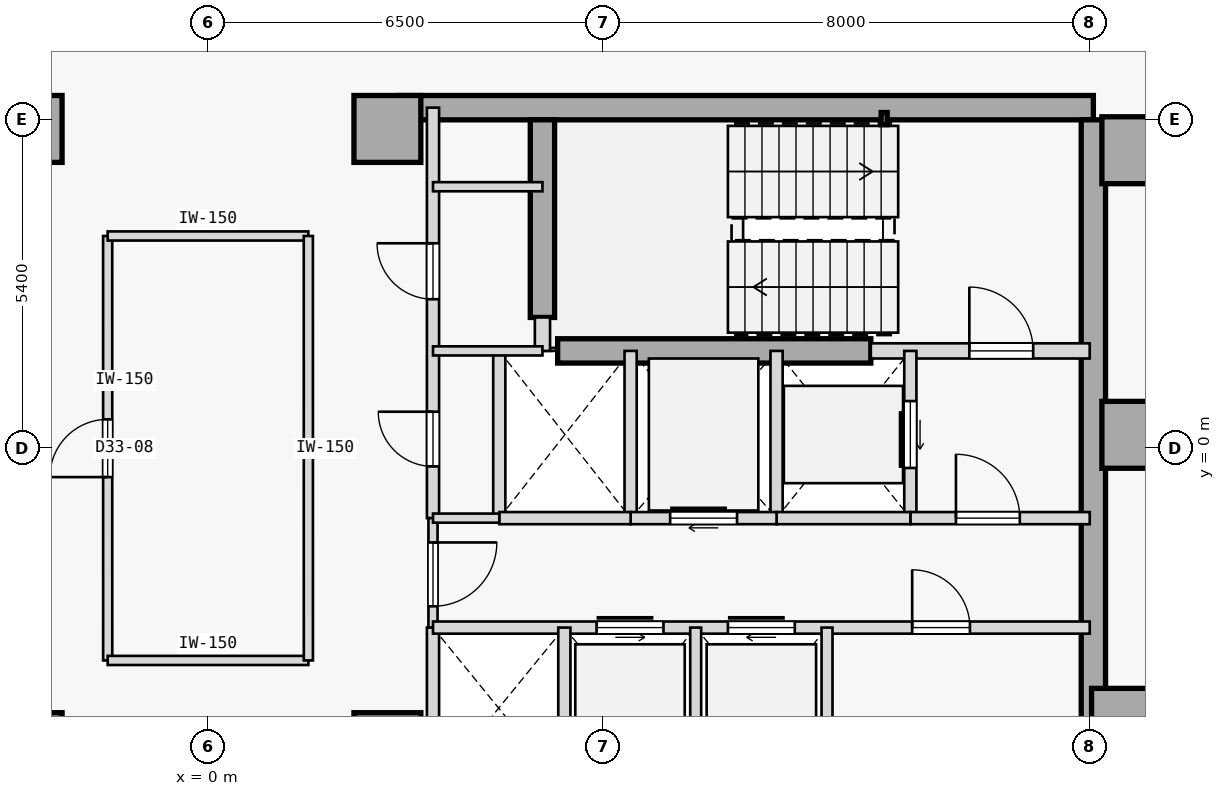
"""IFC4 building model, lengths in metres.
Left out: names, types, materials, properties, quantities, classifications, styles, units other than length and angle.
Written with IfcOpenShell. Run it as: python <this file> out.ifc"""

import sys

from ifc_helpers import new_model, si_unit, direction, frame, frame_2d, origin, origin_2d, place, context, subcontext, project, spatial, rectangle, hollow_rectangle, extrude, element, fill, save


model = new_model("IFC4")
c1 = context("Model", 3, precision=1e-05, world=origin(), true_north=direction((0.0, 1.0)))
c2 = subcontext(c1, "Body", "Model", "MODEL_VIEW")
j1 = project(units=[si_unit("LENGTHUNIT", "METRE"), si_unit("PLANEANGLEUNIT", "RADIAN")], contexts=[c1])
p1 = place(None, origin())
s1 = spatial("IfcSite", under=j1, at=p1, CompositionType="ELEMENT")
p2 = place(p1, origin())
s2 = spatial("IfcBuilding", under=s1, at=p2, CompositionType="ELEMENT")
p3 = place(p2, frame((0.0, 0.0, 131.8)))
s3 = spatial("IfcBuildingStorey", under=s2, at=p3, CompositionType="ELEMENT", Elevation=131.8)
for number, where, z_axis, x_axis in (
    (1, (-2.95, -4.9, 0.0), (0.0, 0.0, 1.0), (1.0, 0.0, 0.0)),
    (2, (-2.95, 5.25, 0.0), (0.0, 0.0, 1.0), (1.0, 0.0, 0.0)),
    (3, (15.25, 4.9, 0.0), (0.0, 0.0, 1.0), (1.0, 0.0, 0.0)),
    (4, (15.25, 0.22, 0.0), (0.0, 0.0, 1.0), (1.0, 0.0, 0.0)),
    (5, (15.08, -4.5, 0.0), (0.0, 0.0, 1.0), (1.0, 0.0, 0.0)),
    (6, (2.95, -4.9, 0.0), (0.0, 0.0, 1.0), (1.0, 0.0, 0.0)),
    (7, (2.95, 5.25, 0.0), (0.0, 0.0, 1.0), (1.0, 0.0, 0.0)),
):
    element("IfcColumn", number, at=place(p3, frame(where, z_axis=z_axis, x_axis=x_axis)), inside=s3, PredefinedType="COLUMN", context=c2, shape_type="SweptSolid", body=[
        extrude(rectangle(XDim=1.1, YDim=1.1, at=origin_2d()), origin(), (0.0, 0.0, 1.0), 3.7),
    ])
p4 = place(p3, frame((3.15, 5.6, 0.0), z_axis=(0.0, 0.0, 1.0), x_axis=(1.0, 0.0, 0.0)))
e8 = element("IfcWall", 8, at=p4, inside=s3, PredefinedType="SHEAR", context=c2, shape_type="SweptSolid", body=[
    extrude(rectangle(XDim=11.41, YDim=0.4, at=frame_2d((5.705, 0.0))), origin(), (0.0, 0.0, 1.0), 3.475),
])
p5 = place(p3, frame((14.56, -5.4, 0.0), z_axis=(0.0, 0.0, 1.0), x_axis=(0.0, 1.0, 0.0)))
e9 = element("IfcWall", 9, at=p5, inside=s3, PredefinedType="SHEAR", context=c2, shape_type="SweptSolid", body=[
    extrude(rectangle(XDim=10.8, YDim=0.4, at=frame_2d((5.4, 0.0))), origin(), (0.0, 0.0, 1.0), 3.475),
])
p6 = place(p3, frame((5.5, 2.15, 0.0), z_axis=(0.0, 0.0, 1.0), x_axis=(0.0, 1.0, 0.0)))
e10 = element("IfcWall", 10, at=p6, inside=s3, PredefinedType="SHEAR", context=c2, shape_type="SweptSolid", body=[
    extrude(rectangle(XDim=3.25, YDim=0.4, at=frame_2d((1.625, 0.0))), origin(), (0.0, 0.0, 1.0), 3.475),
])
p7 = place(p3, frame((5.75, 1.6, 0.0), z_axis=(0.0, 0.0, 1.0), x_axis=(1.0, 0.0, 0.0)))
e11 = element("IfcWall", 11, at=p7, inside=s3, PredefinedType="SHEAR", context=c2, shape_type="SweptSolid", body=[
    extrude(rectangle(XDim=5.15, YDim=0.4, at=frame_2d((2.575, 0.0))), origin(), (0.0, 0.0, 1.0), 3.475),
])
p8 = place(p3, frame((11.12, 5.42, 0.0), z_axis=(0.0, 0.0, 1.0), x_axis=(1.0, 0.0, 0.0)))
e12 = element("IfcColumn", 12, at=p8, inside=s3, PredefinedType="COLUMN", context=c2, shape_type="SweptSolid", body=[
    extrude(hollow_rectangle(XDim=0.1, YDim=0.2, WallThickness=0.008, at=origin_2d()), origin(), (0.0, 0.0, 1.0), 3.7),
])
p9 = place(p3, frame((10.9, 1.6, 0.0), z_axis=(0.0, 0.0, 1.0), x_axis=(1.0, 0.0, 0.0)))
e13 = element("IfcWall", 13, at=p9, inside=s3, PredefinedType="STANDARD", context=c2, shape_type="SweptSolid", body=[
    extrude(rectangle(XDim=3.6, YDim=0.25, at=frame_2d((1.8, 0.0))), origin(), (0.0, 0.0, 1.0), 3.475),
])
p10 = place(p9, frame((1.62, 0.0, 0.0)))
e14 = element("IfcOpeningElement", 14, at=p10, cuts=e13, PredefinedType="OPENING", context=c2, shape_type="SweptSolid", body=[
    extrude(rectangle(XDim=1.05, YDim=2.15, at=frame_2d((0.525, 1.075))), frame((0.0, 0.135, 0.0), z_axis=(0.0, -1.0, 0.0), x_axis=(1.0, 0.0, 0.0)), (0.0, 0.0, 1.0), 0.27),
])
p11 = place(p3, frame((5.5, 1.6, 0.0), z_axis=(0.0, 0.0, 1.0), x_axis=(0.0, 1.0, 0.0)))
e15 = element("IfcWall", 15, at=p11, inside=s3, PredefinedType="STANDARD", context=c2, shape_type="SweptSolid", body=[
    extrude(rectangle(XDim=0.55, YDim=0.25, at=frame_2d((0.275, 0.0))), origin(), (0.0, 0.0, 1.0), 3.475),
])
p12 = place(p3, frame((3.7, -1.15, 0.0), z_axis=(0.0, 0.0, 1.0), x_axis=(0.0, 1.0, 0.0)))
e16 = element("IfcWall", 16, at=p12, inside=s3, PredefinedType="STANDARD", context=c2, shape_type="SweptSolid", body=[
    extrude(rectangle(XDim=6.75, YDim=0.2, at=frame_2d((3.375, 0.0))), origin(), (0.0, 0.0, 1.0), 3.475),
])
p13 = place(p12, frame((3.6, 0.0, 0.0)))
e17 = element("IfcOpeningElement", 17, at=p13, cuts=e16, PredefinedType="OPENING", context=c2, shape_type="SweptSolid", body=[
    extrude(rectangle(XDim=0.92, YDim=2.15, at=frame_2d((0.46, 1.075))), frame((0.0, 0.11, 0.0), z_axis=(0.0, -1.0, 0.0), x_axis=(1.0, 0.0, 0.0)), (0.0, 0.0, 1.0), 0.22),
])
p14 = place(p12, frame((0.85, 0.0, 0.0)))
e18 = element("IfcOpeningElement", 18, at=p14, cuts=e16, PredefinedType="OPENING", context=c2, shape_type="SweptSolid", body=[
    extrude(rectangle(XDim=0.9, YDim=2.15, at=frame_2d((0.45, 1.075))), frame((0.0, 0.11, 0.0), z_axis=(0.0, -1.0, 0.0), x_axis=(1.0, 0.0, 0.0)), (0.0, 0.0, 1.0), 0.22),
])
p15 = place(p3, frame((3.7, -2.95, 0.0), z_axis=(0.0, 0.0, 1.0), x_axis=(0.0, 1.0, 0.0)))
e19 = element("IfcWall", 19, at=p15, inside=s3, PredefinedType="PARTITIONING", context=c2, shape_type="SweptSolid", body=[
    extrude(rectangle(XDim=1.8, YDim=0.15, at=frame_2d((0.9, 0.0))), origin(), (0.0, 0.0, 1.0), 3.475),
])
p16 = place(p15, frame((0.35, 0.0, 0.0)))
e20 = element("IfcOpeningElement", 20, at=p16, cuts=e19, PredefinedType="OPENING", context=c2, shape_type="SweptSolid", body=[
    extrude(rectangle(XDim=1.05, YDim=2.18, at=frame_2d((0.525, 1.09))), frame((0.0, 0.085, 0.0), z_axis=(0.0, -1.0, 0.0), x_axis=(1.0, 0.0, 0.0)), (0.0, 0.0, 1.0), 0.17),
])
p17 = place(p3, frame((3.7, -5.6, 0.0), z_axis=(0.0, 0.0, 1.0), x_axis=(0.0, 1.0, 0.0)))
e21 = element("IfcWall", 21, at=p17, inside=s3, PredefinedType="STANDARD", context=c2, shape_type="SweptSolid", body=[
    extrude(rectangle(XDim=2.65, YDim=0.2, at=frame_2d((1.325, 0.0))), origin(), (0.0, 0.0, 1.0), 3.475),
])
p18 = place(p3, frame((11.55, -1.15, 0.0), z_axis=(0.0, 0.0, 1.0), x_axis=(0.0, 1.0, 0.0)))
e22 = element("IfcWall", 22, at=p18, inside=s3, PredefinedType="STANDARD", context=c2, shape_type="SweptSolid", body=[
    extrude(rectangle(XDim=2.75, YDim=0.2, at=frame_2d((1.375, 0.0))), origin(), (0.0, 0.0, 1.0), 3.475),
])
p19 = place(p18, frame((0.825, 0.0, 0.0)))
e23 = element("IfcOpeningElement", 23, at=p19, cuts=e22, PredefinedType="OPENING", context=c2, shape_type="SweptSolid", body=[
    extrude(rectangle(XDim=1.1, YDim=2.15, at=frame_2d((0.55, 1.075))), frame((0.0, 0.11, 0.0), z_axis=(0.0, -1.0, 0.0), x_axis=(1.0, 0.0, 0.0)), (0.0, 0.0, 1.0), 0.22),
])
p20 = place(p3, frame((9.35, -1.15, 0.0), z_axis=(0.0, 0.0, 1.0), x_axis=(0.0, 1.0, 0.0)))
e24 = element("IfcWall", 24, at=p20, inside=s3, PredefinedType="STANDARD", context=c2, shape_type="SweptSolid", body=[
    extrude(rectangle(XDim=2.75, YDim=0.2, at=frame_2d((1.375, 0.0))), origin(), (0.0, 0.0, 1.0), 3.475),
])
p21 = place(p3, frame((11.55, -1.15, 0.0), z_axis=(0.0, 0.0, 1.0), x_axis=(1.0, 0.0, 0.0)))
e25 = element("IfcWall", 25, at=p21, inside=s3, PredefinedType="STANDARD", context=c2, shape_type="SweptSolid", body=[
    extrude(rectangle(XDim=2.95, YDim=0.2, at=frame_2d((1.475, 0.0))), origin(), (0.0, 0.0, 1.0), 3.475),
])
p22 = place(p21, frame((0.75, 0.0, 0.0)))
e26 = element("IfcOpeningElement", 26, at=p22, cuts=e25, PredefinedType="OPENING", context=c2, shape_type="SweptSolid", body=[
    extrude(rectangle(XDim=1.05, YDim=2.18, at=frame_2d((0.525, 1.09))), frame((0.0, 0.11, 0.0), z_axis=(0.0, -1.0, 0.0), x_axis=(1.0, 0.0, 0.0)), (0.0, 0.0, 1.0), 0.22),
])
p23 = place(p3, frame((9.35, -1.15, 0.0), z_axis=(0.0, 0.0, 1.0), x_axis=(1.0, 0.0, 0.0)))
e27 = element("IfcWall", 27, at=p23, inside=s3, PredefinedType="STANDARD", context=c2, shape_type="SweptSolid", body=[
    extrude(rectangle(XDim=2.2, YDim=0.2, at=frame_2d((1.1, 0.0))), origin(), (0.0, 0.0, 1.0), 3.475),
])
p24 = place(p3, frame((6.95, -1.15, 0.0), z_axis=(0.0, 0.0, 1.0), x_axis=(0.0, 1.0, 0.0)))
e28 = element("IfcWall", 28, at=p24, inside=s3, PredefinedType="STANDARD", context=c2, shape_type="SweptSolid", body=[
    extrude(rectangle(XDim=2.75, YDim=0.2, at=frame_2d((1.375, 0.0))), origin(), (0.0, 0.0, 1.0), 3.475),
])
p25 = place(p3, frame((6.95, -1.15, 0.0), z_axis=(0.0, 0.0, 1.0), x_axis=(1.0, 0.0, 0.0)))
e29 = element("IfcWall", 29, at=p25, inside=s3, PredefinedType="STANDARD", context=c2, shape_type="SweptSolid", body=[
    extrude(rectangle(XDim=2.4, YDim=0.2, at=frame_2d((1.2, 0.0))), origin(), (0.0, 0.0, 1.0), 3.475),
])
p26 = place(p25, frame((0.65, 0.0, 0.0)))
e30 = element("IfcOpeningElement", 30, at=p26, cuts=e29, PredefinedType="OPENING", context=c2, shape_type="SweptSolid", body=[
    extrude(rectangle(XDim=1.1, YDim=2.15, at=frame_2d((0.55, 1.075))), frame((0.0, 0.11, 0.0), z_axis=(0.0, -1.0, 0.0), x_axis=(1.0, 0.0, 0.0)), (0.0, 0.0, 1.0), 0.22),
])
p27 = place(p3, frame((4.79, -1.15, 0.0), z_axis=(0.0, 0.0, 1.0), x_axis=(0.0, 1.0, 0.0)))
e31 = element("IfcWall", 31, at=p27, inside=s3, PredefinedType="STANDARD", context=c2, shape_type="SweptSolid", body=[
    extrude(rectangle(XDim=2.75, YDim=0.2, at=frame_2d((1.375, 0.0))), origin(), (0.0, 0.0, 1.0), 3.475),
])
p28 = place(p3, frame((4.79, -1.15, 0.0), z_axis=(0.0, 0.0, 1.0), x_axis=(1.0, 0.0, 0.0)))
e32 = element("IfcWall", 32, at=p28, inside=s3, PredefinedType="STANDARD", context=c2, shape_type="SweptSolid", body=[
    extrude(rectangle(XDim=2.16, YDim=0.2, at=frame_2d((1.08, 0.0))), origin(), (0.0, 0.0, 1.0), 3.475),
])
p29 = place(p3, frame((3.7, -1.15, 0.0), z_axis=(0.0, 0.0, 1.0), x_axis=(1.0, 0.0, 0.0)))
e33 = element("IfcWall", 33, at=p29, inside=s3, PredefinedType="PARTITIONING", context=c2, shape_type="SweptSolid", body=[
    extrude(rectangle(XDim=1.09, YDim=0.15, at=frame_2d((0.545, 0.0))), origin(), (0.0, 0.0, 1.0), 3.475),
])
p30 = place(p3, frame((3.7, -2.95, 0.0), z_axis=(0.0, 0.0, 1.0), x_axis=(1.0, 0.0, 0.0)))
e34 = element("IfcWall", 34, at=p30, inside=s3, PredefinedType="STANDARD", context=c2, shape_type="SweptSolid", body=[
    extrude(rectangle(XDim=10.8, YDim=0.2, at=frame_2d((5.4, 0.0))), origin(), (0.0, 0.0, 1.0), 3.475),
])
p31 = place(p30, frame((2.69, 0.0, 0.0)))
e35 = element("IfcOpeningElement", 35, at=p31, cuts=e34, PredefinedType="OPENING", context=c2, shape_type="SweptSolid", body=[
    extrude(rectangle(XDim=1.1, YDim=2.15, at=frame_2d((0.55, 1.075))), frame((0.0, 0.11, 0.0), z_axis=(0.0, -1.0, 0.0), x_axis=(1.0, 0.0, 0.0)), (0.0, 0.0, 1.0), 0.22),
])
p32 = place(p30, frame((4.85, 0.0, 0.0)))
e36 = element("IfcOpeningElement", 36, at=p32, cuts=e34, PredefinedType="OPENING", context=c2, shape_type="SweptSolid", body=[
    extrude(rectangle(XDim=1.1, YDim=2.15, at=frame_2d((0.55, 1.075))), frame((0.0, 0.11, 0.0), z_axis=(0.0, -1.0, 0.0), x_axis=(1.0, 0.0, 0.0)), (0.0, 0.0, 1.0), 0.22),
])
p33 = place(p30, frame((7.88, 0.0, 0.0)))
e37 = element("IfcOpeningElement", 37, at=p33, cuts=e34, PredefinedType="OPENING", context=c2, shape_type="SweptSolid", body=[
    extrude(rectangle(XDim=0.95, YDim=2.15, at=frame_2d((0.475, 1.075))), frame((0.0, 0.11, 0.0), z_axis=(0.0, -1.0, 0.0), x_axis=(1.0, 0.0, 0.0)), (0.0, 0.0, 1.0), 0.22),
])
p34 = place(p3, frame((5.86, -5.6, 0.0), z_axis=(0.0, 0.0, 1.0), x_axis=(0.0, 1.0, 0.0)))
e38 = element("IfcWall", 38, at=p34, inside=s3, PredefinedType="STANDARD", context=c2, shape_type="SweptSolid", body=[
    extrude(rectangle(XDim=2.65, YDim=0.2, at=frame_2d((1.325, 0.0))), origin(), (0.0, 0.0, 1.0), 3.475),
])
for number, where, z_axis, x_axis in (
    (39, (10.18, -5.6, 0.0), (0.0, 0.0, 1.0), (0.0, 1.0, 0.0)),
    (40, (8.02, -5.6, 0.0), (0.0, 0.0, 1.0), (0.0, 1.0, 0.0)),
):
    element("IfcWall", number, at=place(p3, frame(where, z_axis=z_axis, x_axis=x_axis)), inside=s3, PredefinedType="STANDARD", context=c2, shape_type="SweptSolid", body=[
        extrude(rectangle(XDim=2.65, YDim=0.18, at=frame_2d((1.325, 0.0))), origin(), (0.0, 0.0, 1.0), 3.475),
    ])
for number, where, z_axis, x_axis in (
    (41, (3.7, 4.3, 0.0), (0.0, 0.0, 1.0), (1.0, 0.0, 0.0)),
    (42, (3.7, 1.6, 0.0), (0.0, 0.0, 1.0), (1.0, 0.0, 0.0)),
):
    element("IfcWall", number, at=place(p3, frame(where, z_axis=z_axis, x_axis=x_axis)), inside=s3, PredefinedType="PARTITIONING", context=c2, shape_type="SweptSolid", body=[
        extrude(rectangle(XDim=1.8, YDim=0.15, at=frame_2d((0.9, 0.0))), origin(), (0.0, 0.0, 1.0), 3.475),
    ])
p35 = place(p3, frame((-1.65, -3.49, 0.0), z_axis=(0.0, 0.0, 1.0), x_axis=(-0.000104928124, 0.999999994495, 0.0)))
e43 = element("IfcWall", 43, at=p35, inside=s3, PredefinedType="PARTITIONING", context=c2, shape_type="SweptSolid", body=[
    extrude(rectangle(XDim=6.98, YDim=0.15, at=frame_2d((3.49, 0.0))), origin(), (0.0, 0.0, 1.0), 3.475),
])
p36 = place(p35, frame((3.015, 0.0, 0.0)))
e44 = element("IfcOpeningElement", 44, at=p36, cuts=e43, PredefinedType="OPENING", context=c2, shape_type="SweptSolid", body=[
    extrude(rectangle(XDim=0.95, YDim=2.15, at=frame_2d((0.475, 1.075))), frame((0.0, 0.085, 0.0), z_axis=(0.0, -1.0, 0.0), x_axis=(1.0, 0.0, 0.0)), (0.0, 0.0, 1.0), 0.17),
])
p37 = place(p3, frame((-1.65, -3.49, 0.0), z_axis=(0.0, 0.0, 1.0), x_axis=(1.0, 0.0, 0.0)))
e45 = element("IfcWall", 45, at=p37, inside=s3, PredefinedType="PARTITIONING", context=c2, shape_type="SweptSolid", body=[
    extrude(rectangle(XDim=3.3, YDim=0.15, at=frame_2d((1.65, 0.0))), origin(), (0.0, 0.0, 1.0), 3.475),
])
p38 = place(p3, frame((-1.65, 3.49, 0.0), z_axis=(0.0, 0.0, 1.0), x_axis=(1.0, 0.0, 0.0)))
e46 = element("IfcWall", 46, at=p38, inside=s3, PredefinedType="PARTITIONING", context=c2, shape_type="SweptSolid", body=[
    extrude(rectangle(XDim=3.3, YDim=0.15, at=frame_2d((1.65, 0.0))), origin(), (0.0, 0.0, 1.0), 3.475),
])
p39 = place(p3, frame((1.65, -3.49, 0.0), z_axis=(0.0, 0.0, 1.0), x_axis=(-6.9952083e-05, 0.999999997553, 0.0)))
e47 = element("IfcWall", 47, at=p39, inside=s3, PredefinedType="PARTITIONING", context=c2, shape_type="SweptSolid", body=[
    extrude(rectangle(XDim=6.98, YDim=0.15, at=frame_2d((3.49, 0.0))), origin(), (0.0, 0.0, 1.0), 3.475),
])
p40 = place(p10, origin())
e48 = element("IfcDoor", 48, at=p40, inside=s3, OperationType="SINGLE_SWING_LEFT", PredefinedType="DOOR", context=c2, shape_type="SweptSolid", body=[
    extrude(rectangle(XDim=1.05, YDim=2.15, at=frame_2d((0.525, 1.075))), frame((0.0, 0.025, 0.0), z_axis=(0.0, -1.0, 0.0), x_axis=(1.0, 0.0, 0.0)), (0.0, 0.0, 1.0), 0.05),
])
fill(e14, e48)
p41 = place(p22, origin())
e49 = element("IfcDoor", 49, at=p41, inside=s3, OperationType="SINGLE_SWING_LEFT", PredefinedType="DOOR", context=c2, shape_type="SweptSolid", body=[
    extrude(rectangle(XDim=1.05, YDim=2.18, at=frame_2d((0.525, 1.09))), frame((0.0, 0.025, 0.0), z_axis=(0.0, -1.0, 0.0), x_axis=(1.0, 0.0, 0.0)), (0.0, 0.0, 1.0), 0.05),
])
fill(e26, e49)
p42 = place(p16, frame((1.05, 0.0, 0.0), z_axis=(0.0, 0.0, 1.0), x_axis=(-1.0, 0.0, 0.0)))
e50 = element("IfcDoor", 50, at=p42, inside=s3, OperationType="SINGLE_SWING_RIGHT", PredefinedType="DOOR", context=c2, shape_type="SweptSolid", body=[
    extrude(rectangle(XDim=1.05, YDim=2.18, at=frame_2d((0.525, 1.09))), frame((0.0, 0.025, 0.0), z_axis=(0.0, -1.0, 0.0), x_axis=(1.0, 0.0, 0.0)), (0.0, 0.0, 1.0), 0.05),
])
fill(e20, e50)
p43 = place(p19, origin())
e51 = element("IfcDoor", 51, at=p43, inside=s3, OperationType="SLIDING_TO_RIGHT", PredefinedType="DOOR", context=c2, shape_type="SweptSolid", body=[
    extrude(rectangle(XDim=1.1, YDim=2.15, at=frame_2d((0.55, 1.075))), frame((0.0, 0.025, 0.0), z_axis=(0.0, -1.0, 0.0), x_axis=(1.0, 0.0, 0.0)), (0.0, 0.0, 1.0), 0.05),
])
fill(e23, e51)
p44 = place(p26, origin())
e52 = element("IfcDoor", 52, at=p44, inside=s3, OperationType="SLIDING_TO_RIGHT", PredefinedType="DOOR", context=c2, shape_type="SweptSolid", body=[
    extrude(rectangle(XDim=1.1, YDim=2.15, at=frame_2d((0.55, 1.075))), frame((0.0, 0.025, 0.0), z_axis=(0.0, -1.0, 0.0), x_axis=(1.0, 0.0, 0.0)), (0.0, 0.0, 1.0), 0.05),
])
fill(e30, e52)
p45 = place(p31, origin())
e53 = element("IfcDoor", 53, at=p45, inside=s3, OperationType="SLIDING_TO_LEFT", PredefinedType="DOOR", context=c2, shape_type="SweptSolid", body=[
    extrude(rectangle(XDim=1.1, YDim=2.15, at=frame_2d((0.55, 1.075))), frame((0.0, 0.025, 0.0), z_axis=(0.0, -1.0, 0.0), x_axis=(1.0, 0.0, 0.0)), (0.0, 0.0, 1.0), 0.05),
])
fill(e35, e53)
p46 = place(p32, origin())
e54 = element("IfcDoor", 54, at=p46, inside=s3, OperationType="SLIDING_TO_RIGHT", PredefinedType="DOOR", context=c2, shape_type="SweptSolid", body=[
    extrude(rectangle(XDim=1.1, YDim=2.15, at=frame_2d((0.55, 1.075))), frame((0.0, 0.025, 0.0), z_axis=(0.0, -1.0, 0.0), x_axis=(1.0, 0.0, 0.0)), (0.0, 0.0, 1.0), 0.05),
])
fill(e36, e54)
p47 = place(p33, origin())
e55 = element("IfcDoor", 55, at=p47, inside=s3, OperationType="SINGLE_SWING_LEFT", PredefinedType="DOOR", context=c2, shape_type="SweptSolid", body=[
    extrude(rectangle(XDim=0.95, YDim=2.15, at=frame_2d((0.475, 1.075))), frame((0.0, 0.025, 0.0), z_axis=(0.0, -1.0, 0.0), x_axis=(1.0, 0.0, 0.0)), (0.0, 0.0, 1.0), 0.05),
])
fill(e37, e55)
p48 = place(p13, origin())
e56 = element("IfcDoor", 56, at=p48, inside=s3, OperationType="SINGLE_SWING_RIGHT", PredefinedType="DOOR", context=c2, shape_type="SweptSolid", body=[
    extrude(rectangle(XDim=0.92, YDim=2.15, at=frame_2d((0.46, 1.075))), frame((0.0, 0.025, 0.0), z_axis=(0.0, -1.0, 0.0), x_axis=(1.0, 0.0, 0.0)), (0.0, 0.0, 1.0), 0.05),
])
fill(e17, e56)
p49 = place(p14, origin())
e57 = element("IfcDoor", 57, at=p49, inside=s3, OperationType="SINGLE_SWING_RIGHT", PredefinedType="DOOR", context=c2, shape_type="SweptSolid", body=[
    extrude(rectangle(XDim=0.9, YDim=2.15, at=frame_2d((0.45, 1.075))), frame((0.0, 0.025, 0.0), z_axis=(0.0, -1.0, 0.0), x_axis=(1.0, 0.0, 0.0)), (0.0, 0.0, 1.0), 0.05),
])
fill(e18, e57)
p50 = place(p36, origin())
e58 = element("IfcDoor", 58, at=p50, inside=s3, OperationType="SINGLE_SWING_LEFT", PredefinedType="DOOR", context=c2, shape_type="SweptSolid", body=[
    extrude(rectangle(XDim=0.95, YDim=2.15, at=frame_2d((0.475, 1.075))), frame((0.0, 0.025, 0.0), z_axis=(0.0, -1.0, 0.0), x_axis=(1.0, 0.0, 0.0)), (0.0, 0.0, 1.0), 0.05),
])
fill(e44, e58)
save(model, sys.argv[1])
